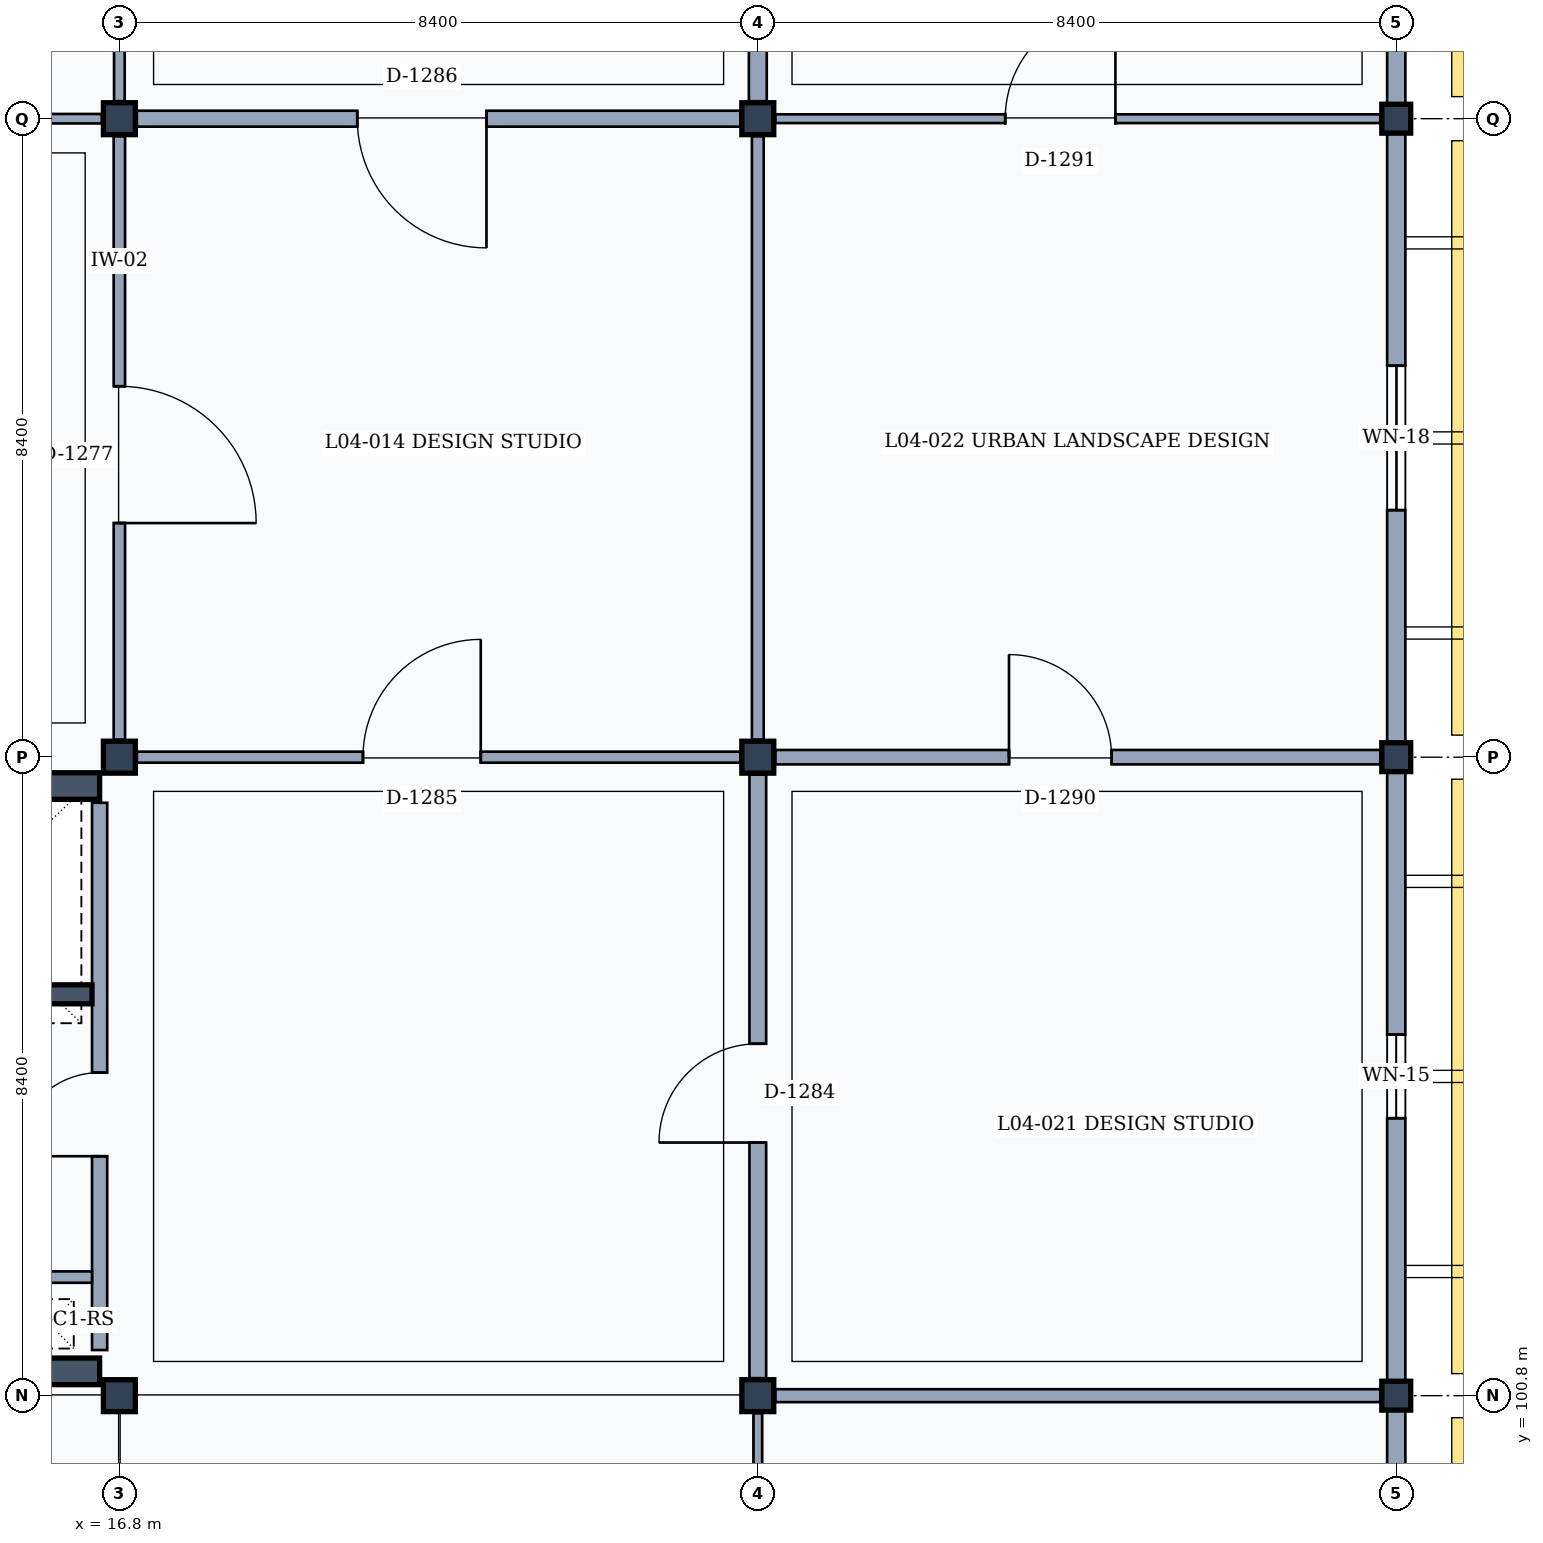
"""IFC4 building model, lengths in metres.
Left out: names, types, materials, properties, quantities, classifications, styles, units other than length and angle.
Written with IfcOpenShell. Run it as: python <this file> out.ifc"""

import sys

from ifc_helpers import new_model, si_unit, direction, frame, frame_2d, origin, origin_2d, place, context, subcontext, project, spatial, rectangle, extrude, element, fill, save


model = new_model("IFC4")
c1 = context("Model", 3, precision=1e-05, world=origin(), true_north=direction((0.0, 1.0)))
c2 = subcontext(c1, "Body", "Model", "MODEL_VIEW")
j1 = project(units=[si_unit("LENGTHUNIT", "METRE"), si_unit("PLANEANGLEUNIT", "RADIAN")], contexts=[c1])
p1 = place(None, origin())
s1 = spatial("IfcSite", under=j1, at=p1, CompositionType="ELEMENT")
p2 = place(p1, origin())
s2 = spatial("IfcBuilding", under=s1, at=p2, CompositionType="ELEMENT")
p3 = place(p2, frame((0.0, 0.0, 18.0)))
s3 = spatial("IfcBuildingStorey", under=s2, at=p3, CompositionType="ELEMENT", Elevation=18.0)
for number, where, z_axis, x_axis in (
    (1, (16.8, 100.8, 0.0), (0.0, 0.0, 1.0), (1.0, 0.0, 0.0)),
    (2, (16.8, 109.2, 0.0), (0.0, 0.0, 1.0), (1.0, 0.0, 0.0)),
    (3, (16.8, 117.6, 0.0), (0.0, 0.0, 1.0), (1.0, 0.0, 0.0)),
    (4, (25.2, 100.8, 0.0), (0.0, 0.0, 1.0), (1.0, 0.0, 0.0)),
    (5, (25.2, 109.2, 0.0), (0.0, 0.0, 1.0), (1.0, 0.0, 0.0)),
    (6, (25.2, 117.6, 0.0), (0.0, 0.0, 1.0), (1.0, 0.0, 0.0)),
):
    element("IfcColumn", number, at=place(p3, frame(where, z_axis=z_axis, x_axis=x_axis)), inside=s3, PredefinedType="COLUMN", context=c2, shape_type="SweptSolid", body=[
        extrude(rectangle(XDim=0.42, YDim=0.42, at=origin_2d()), origin(), (0.0, 0.0, 1.0), 4.2),
    ])
for number, where, z_axis, x_axis in (
    (7, (33.6, 100.8, 0.0), (0.0, 0.0, 1.0), (1.0, 0.0, 0.0)),
    (8, (33.6, 109.2, 0.0), (0.0, 0.0, 1.0), (1.0, 0.0, 0.0)),
    (9, (33.6, 117.6, 0.0), (0.0, 0.0, 1.0), (1.0, 0.0, 0.0)),
):
    element("IfcColumn", number, at=place(p3, frame(where, z_axis=z_axis, x_axis=x_axis)), inside=s3, PredefinedType="COLUMN", context=c2, shape_type="SweptSolid", body=[
        extrude(rectangle(XDim=0.38, YDim=0.38, at=origin_2d()), origin(), (0.0, 0.0, 1.0), 4.2),
    ])
p4 = place(p3, frame((33.6, 100.61, 0.0), z_axis=(0.0, 0.0, 1.0), x_axis=(0.0, -1.0, 0.0)))
e10 = element("IfcWall", 10, at=p4, inside=s3, PredefinedType="SOLIDWALL", context=c2, shape_type="SweptSolid", body=[
    extrude(rectangle(XDim=8.02, YDim=0.24, at=frame_2d((4.01, 0.0))), origin(), (0.0, 0.0, 1.0), 3.36),
])
p5 = place(p4, frame((2.91, 0.0, 0.9)))
e11 = element("IfcOpeningElement", 11, at=p5, cuts=e10, PredefinedType="OPENING", context=c2, shape_type="SweptSolid", body=[
    extrude(rectangle(XDim=2.2, YDim=1.9, at=frame_2d((1.1, 0.95))), frame((0.0, 0.13, 0.0), z_axis=(0.0, -1.0, 0.0), x_axis=(1.0, 0.0, 0.0)), (0.0, 0.0, 1.0), 0.26),
])
p6 = place(p3, frame((33.6, 109.01, 0.0), z_axis=(0.0, 0.0, 1.0), x_axis=(0.0, -1.0, 0.0)))
e12 = element("IfcWall", 12, at=p6, inside=s3, PredefinedType="SOLIDWALL", context=c2, shape_type="SweptSolid", body=[
    extrude(rectangle(XDim=8.02, YDim=0.24, at=frame_2d((4.01, 0.0))), origin(), (0.0, 0.0, 1.0), 3.36),
])
p7 = place(p6, frame((3.46, 0.0, 0.9)))
e13 = element("IfcOpeningElement", 13, at=p7, cuts=e12, PredefinedType="OPENING", context=c2, shape_type="SweptSolid", body=[
    extrude(rectangle(XDim=1.1, YDim=1.95, at=frame_2d((0.55, 0.975))), frame((0.0, 0.13, 0.0), z_axis=(0.0, -1.0, 0.0), x_axis=(1.0, 0.0, 0.0)), (0.0, 0.0, 1.0), 0.26),
])
p8 = place(p3, frame((33.6, 117.41, 0.0), z_axis=(0.0, 0.0, 1.0), x_axis=(0.0, -1.0, 0.0)))
e14 = element("IfcWall", 14, at=p8, inside=s3, PredefinedType="SOLIDWALL", context=c2, shape_type="SweptSolid", body=[
    extrude(rectangle(XDim=8.02, YDim=0.24, at=frame_2d((4.01, 0.0))), origin(), (0.0, 0.0, 1.0), 3.36),
])
p9 = place(p8, frame((3.06, 0.0, 0.9)))
e15 = element("IfcOpeningElement", 15, at=p9, cuts=e14, PredefinedType="OPENING", context=c2, shape_type="SweptSolid", body=[
    extrude(rectangle(XDim=1.9, YDim=2.05, at=frame_2d((0.95, 1.025))), frame((0.0, 0.13, 0.0), z_axis=(0.0, -1.0, 0.0), x_axis=(1.0, 0.0, 0.0)), (0.0, 0.0, 1.0), 0.26),
])
p10 = place(p3, frame((33.6, 125.83, 0.0), z_axis=(0.0, 0.0, 1.0), x_axis=(0.0, -1.0, 0.0)))
e16 = element("IfcWall", 16, at=p10, inside=s3, PredefinedType="SOLIDWALL", context=c2, shape_type="SweptSolid", body=[
    extrude(rectangle(XDim=8.04, YDim=0.24, at=frame_2d((4.02, 0.0))), origin(), (0.0, 0.0, 1.0), 3.36),
])
p11 = place(p10, frame((3.395, 0.0, 0.9)))
e17 = element("IfcOpeningElement", 17, at=p11, cuts=e16, PredefinedType="OPENING", context=c2, shape_type="SweptSolid", body=[
    extrude(rectangle(XDim=1.25, YDim=1.7, at=frame_2d((0.625, 0.85))), frame((0.0, 0.13, 0.0), z_axis=(0.0, -1.0, 0.0), x_axis=(1.0, 0.0, 0.0)), (0.0, 0.0, 1.0), 0.26),
])
p12 = place(p3, frame((8.665, 108.82, 0.0), z_axis=(0.0, 0.0, 1.0), x_axis=(1.0, 0.0, 0.0)))
e18 = element("IfcWall", 18, at=p12, inside=s3, PredefinedType="SHEAR", context=c2, shape_type="SweptSolid", body=[
    extrude(rectangle(XDim=7.875, YDim=0.35, at=frame_2d((3.938, 0.0))), origin(), (0.0, 0.0, 1.0), 3.98),
])
p13 = place(p3, frame((16.54, 108.6, 0.0), z_axis=(0.0, 0.0, 1.0), x_axis=(0.0, -1.0, 0.0)))
e19 = element("IfcWall", 19, at=p13, inside=s3, PredefinedType="PARTITIONING", context=c2, shape_type="SweptSolid", body=[
    extrude(rectangle(XDim=7.2, YDim=0.2, at=frame_2d((3.6, 0.0))), origin(), (0.0, 0.0, 1.0), 3.32),
])
p14 = place(p13, frame((3.55, 0.0, 0.0)))
e20 = element("IfcOpeningElement", 20, at=p14, cuts=e19, PredefinedType="OPENING", context=c2, shape_type="SweptSolid", body=[
    extrude(rectangle(XDim=1.1, YDim=2.15, at=frame_2d((0.55, 1.075))), frame((0.0, 0.11, 0.0), z_axis=(0.0, -1.0, 0.0), x_axis=(1.0, 0.0, 0.0)), (0.0, 0.0, 1.0), 0.22),
])
p15 = place(p3, frame((16.54, 101.12, 0.0), z_axis=(0.0, 0.0, 1.0), x_axis=(-1.0, 0.0, 0.0)))
e21 = element("IfcWall", 21, at=p15, inside=s3, PredefinedType="SHEAR", context=c2, shape_type="SweptSolid", body=[
    extrude(rectangle(XDim=7.875, YDim=0.35, at=frame_2d((3.938, 0.0))), origin(), (0.0, 0.0, 1.0), 3.98),
])
p16 = place(p3, frame((15.58, 102.36, 0.0), z_axis=(0.0, 0.0, 1.0), x_axis=(1.0, 0.0, 0.0)))
e22 = element("IfcWall", 22, at=p16, inside=s3, PredefinedType="PARTITIONING", context=c2, shape_type="SweptSolid", body=[
    extrude(rectangle(XDim=0.86, YDim=0.15, at=frame_2d((0.43, 0.0))), origin(), (0.0, 0.0, 1.0), 3.32),
])
p17 = place(p3, frame((12.98, 106.08, 0.0), z_axis=(0.0, 0.0, 1.0), x_axis=(1.0, 0.0, 0.0)))
e23 = element("IfcWall", 23, at=p17, inside=s3, PredefinedType="SHEAR", context=c2, shape_type="SweptSolid", body=[
    extrude(rectangle(XDim=3.46, YDim=0.25, at=frame_2d((1.73, 0.0))), origin(), (0.0, 0.0, 1.0), 3.98),
])
p18 = place(p17, frame((1.1, 0.0, 0.0)))
e24 = element("IfcOpeningElement", 24, at=p18, cuts=e23, PredefinedType="OPENING", context=c2, shape_type="SweptSolid", body=[
    extrude(rectangle(XDim=1.1, YDim=2.15, at=frame_2d((0.55, 1.075))), frame((0.0, 0.135, 0.0), z_axis=(0.0, -1.0, 0.0), x_axis=(1.0, 0.0, 0.0)), (0.0, 0.0, 1.0), 0.27),
])
p19 = place(p3, frame((16.8, 109.43, 0.0), z_axis=(0.0, 0.0, 1.0), x_axis=(0.0, 1.0, 0.0)))
e25 = element("IfcWall", 25, at=p19, inside=s3, PredefinedType="PARTITIONING", context=c2, shape_type="SweptSolid", body=[
    extrude(rectangle(XDim=7.94, YDim=0.15, at=frame_2d((3.97, 0.0))), origin(), (0.0, 0.0, 1.0), 3.32),
])
p20 = place(p19, frame((2.85, 0.0, 0.0)))
e26 = element("IfcOpeningElement", 26, at=p20, cuts=e25, PredefinedType="OPENING", context=c2, shape_type="SweptSolid", body=[
    extrude(rectangle(XDim=1.8, YDim=2.3, at=frame_2d((0.9, 1.15))), frame((0.0, 0.085, 0.0), z_axis=(0.0, -1.0, 0.0), x_axis=(1.0, 0.0, 0.0)), (0.0, 0.0, 1.0), 0.17),
])
p21 = place(p3, frame((8.63, 117.6, 0.0), z_axis=(0.0, 0.0, 1.0), x_axis=(1.0, 0.0, 0.0)))
e27 = element("IfcWall", 27, at=p21, inside=s3, PredefinedType="PARTITIONING", context=c2, shape_type="SweptSolid", body=[
    extrude(rectangle(XDim=7.94, YDim=0.125, at=frame_2d((3.97, 0.0))), origin(), (0.0, 0.0, 1.0), 3.32),
])
p22 = place(p21, frame((3.15, 0.0, 0.0)))
e28 = element("IfcOpeningElement", 28, at=p22, cuts=e27, PredefinedType="OPENING", context=c2, shape_type="SweptSolid", body=[
    extrude(rectangle(XDim=1.2, YDim=2.2, at=frame_2d((0.6, 1.1))), frame((0.0, 0.073, 0.0), z_axis=(0.0, -1.0, 0.0), x_axis=(1.0, 0.0, 0.0)), (0.0, 0.0, 1.0), 0.145),
])
p23 = place(p3, frame((16.8, 117.83, 0.0), z_axis=(0.0, 0.0, 1.0), x_axis=(0.0, 1.0, 0.0)))
e29 = element("IfcWall", 29, at=p23, inside=s3, PredefinedType="PARTITIONING", context=c2, shape_type="SweptSolid", body=[
    extrude(rectangle(XDim=7.94, YDim=0.14, at=frame_2d((3.97, 0.0))), origin(), (0.0, 0.0, 1.0), 3.32),
])
p24 = place(p3, frame((25.2, 92.63, 0.0), z_axis=(0.0, 0.0, 1.0), x_axis=(0.0, 1.0, 0.0)))
e30 = element("IfcWall", 30, at=p24, inside=s3, PredefinedType="PARTITIONING", context=c2, shape_type="SweptSolid", body=[
    extrude(rectangle(XDim=7.94, YDim=0.115, at=frame_2d((3.97, 0.0))), origin(), (0.0, 0.0, 1.0), 3.32),
])
p25 = place(p24, frame((3.175, 0.0, 0.0)))
e31 = element("IfcOpeningElement", 31, at=p25, cuts=e30, PredefinedType="OPENING", context=c2, shape_type="SweptSolid", body=[
    extrude(rectangle(XDim=1.15, YDim=2.25, at=frame_2d((0.575, 1.125))), frame((0.0, 0.067, 0.0), z_axis=(0.0, -1.0, 0.0), x_axis=(1.0, 0.0, 0.0)), (0.0, 0.0, 1.0), 0.135),
])
p26 = place(p3, frame((25.2, 101.03, 0.0), z_axis=(0.0, 0.0, 1.0), x_axis=(0.0, 1.0, 0.0)))
e32 = element("IfcWall", 32, at=p26, inside=s3, PredefinedType="PARTITIONING", context=c2, shape_type="SweptSolid", body=[
    extrude(rectangle(XDim=7.94, YDim=0.22, at=frame_2d((3.97, 0.0))), origin(), (0.0, 0.0, 1.0), 3.32),
])
p27 = place(p26, frame((3.1, 0.0, 0.0)))
e33 = element("IfcOpeningElement", 33, at=p27, cuts=e32, PredefinedType="OPENING", context=c2, shape_type="SweptSolid", body=[
    extrude(rectangle(XDim=1.3, YDim=2.2, at=frame_2d((0.65, 1.1))), frame((0.0, 0.12, 0.0), z_axis=(0.0, -1.0, 0.0), x_axis=(1.0, 0.0, 0.0)), (0.0, 0.0, 1.0), 0.24),
])
p28 = place(p3, frame((17.03, 109.2, 0.0), z_axis=(0.0, 0.0, 1.0), x_axis=(1.0, 0.0, 0.0)))
e34 = element("IfcWall", 34, at=p28, inside=s3, PredefinedType="PARTITIONING", context=c2, shape_type="SweptSolid", body=[
    extrude(rectangle(XDim=7.94, YDim=0.145, at=frame_2d((3.97, 0.0))), origin(), (0.0, 0.0, 1.0), 3.32),
])
p29 = place(p28, frame((2.975, 0.0, 0.0)))
e35 = element("IfcOpeningElement", 35, at=p29, cuts=e34, PredefinedType="OPENING", context=c2, shape_type="SweptSolid", body=[
    extrude(rectangle(XDim=1.55, YDim=2.35, at=frame_2d((0.775, 1.175))), frame((0.0, 0.083, 0.0), z_axis=(0.0, -1.0, 0.0), x_axis=(1.0, 0.0, 0.0)), (0.0, 0.0, 1.0), 0.165),
])
p30 = place(p3, frame((25.2, 109.43, 0.0), z_axis=(0.0, 0.0, 1.0), x_axis=(0.0, 1.0, 0.0)))
e36 = element("IfcWall", 36, at=p30, inside=s3, PredefinedType="PARTITIONING", context=c2, shape_type="SweptSolid", body=[
    extrude(rectangle(XDim=7.94, YDim=0.155, at=frame_2d((3.97, 0.0))), origin(), (0.0, 0.0, 1.0), 3.32),
])
p31 = place(p3, frame((17.03, 117.6, 0.0), z_axis=(0.0, 0.0, 1.0), x_axis=(1.0, 0.0, 0.0)))
e37 = element("IfcWall", 37, at=p31, inside=s3, PredefinedType="PARTITIONING", context=c2, shape_type="SweptSolid", body=[
    extrude(rectangle(XDim=7.94, YDim=0.21, at=frame_2d((3.97, 0.0))), origin(), (0.0, 0.0, 1.0), 3.32),
])
p32 = place(p31, frame((2.9, 0.0, 0.0)))
e38 = element("IfcOpeningElement", 38, at=p32, cuts=e37, PredefinedType="OPENING", context=c2, shape_type="SweptSolid", body=[
    extrude(rectangle(XDim=1.7, YDim=2.3, at=frame_2d((0.85, 1.15))), frame((0.0, 0.115, 0.0), z_axis=(0.0, -1.0, 0.0), x_axis=(1.0, 0.0, 0.0)), (0.0, 0.0, 1.0), 0.23),
])
p33 = place(p3, frame((25.2, 117.83, 0.0), z_axis=(0.0, 0.0, 1.0), x_axis=(0.0, 1.0, 0.0)))
e39 = element("IfcWall", 39, at=p33, inside=s3, PredefinedType="PARTITIONING", context=c2, shape_type="SweptSolid", body=[
    extrude(rectangle(XDim=7.94, YDim=0.235, at=frame_2d((3.97, 0.0))), origin(), (0.0, 0.0, 1.0), 3.32),
])
p34 = place(p3, frame((25.43, 100.8, 0.0), z_axis=(0.0, 0.0, 1.0), x_axis=(1.0, 0.0, 0.0)))
e40 = element("IfcWall", 40, at=p34, inside=s3, PredefinedType="PARTITIONING", context=c2, shape_type="SweptSolid", body=[
    extrude(rectangle(XDim=7.96, YDim=0.17, at=frame_2d((3.98, 0.0))), origin(), (0.0, 0.0, 1.0), 3.32),
])
p35 = place(p3, frame((25.43, 109.2, 0.0), z_axis=(0.0, 0.0, 1.0), x_axis=(1.0, 0.0, 0.0)))
e41 = element("IfcWall", 41, at=p35, inside=s3, PredefinedType="PARTITIONING", context=c2, shape_type="SweptSolid", body=[
    extrude(rectangle(XDim=7.96, YDim=0.19, at=frame_2d((3.98, 0.0))), origin(), (0.0, 0.0, 1.0), 3.32),
])
p36 = place(p35, frame((3.075, 0.0, 0.0)))
e42 = element("IfcOpeningElement", 42, at=p36, cuts=e41, PredefinedType="OPENING", context=c2, shape_type="SweptSolid", body=[
    extrude(rectangle(XDim=1.35, YDim=2.25, at=frame_2d((0.675, 1.125))), frame((0.0, 0.105, 0.0), z_axis=(0.0, -1.0, 0.0), x_axis=(1.0, 0.0, 0.0)), (0.0, 0.0, 1.0), 0.21),
])
p37 = place(p3, frame((25.43, 117.6, 0.0), z_axis=(0.0, 0.0, 1.0), x_axis=(1.0, 0.0, 0.0)))
e43 = element("IfcWall", 43, at=p37, inside=s3, PredefinedType="PARTITIONING", context=c2, shape_type="SweptSolid", body=[
    extrude(rectangle(XDim=7.96, YDim=0.115, at=frame_2d((3.98, 0.0))), origin(), (0.0, 0.0, 1.0), 3.32),
])
p38 = place(p37, frame((3.025, 0.0, 0.0)))
e44 = element("IfcOpeningElement", 44, at=p38, cuts=e43, PredefinedType="OPENING", context=c2, shape_type="SweptSolid", body=[
    extrude(rectangle(XDim=1.45, YDim=2.35, at=frame_2d((0.725, 1.175))), frame((0.0, 0.067, 0.0), z_axis=(0.0, -1.0, 0.0), x_axis=(1.0, 0.0, 0.0)), (0.0, 0.0, 1.0), 0.135),
])
p39 = place(p7, origin())
e45 = element("IfcWindow", 45, at=p39, inside=s3, PartitioningType="SINGLE_PANEL", PredefinedType="WINDOW", context=c2, shape_type="SweptSolid", body=[
    extrude(rectangle(XDim=1.1, YDim=1.95, at=frame_2d((0.55, 0.975))), frame((0.0, 0.03, 0.0), z_axis=(0.0, -1.0, 0.0), x_axis=(1.0, 0.0, 0.0)), (0.0, 0.0, 1.0), 0.06),
])
fill(e13, e45)
p40 = place(p9, origin())
e46 = element("IfcWindow", 46, at=p40, inside=s3, PartitioningType="SINGLE_PANEL", PredefinedType="WINDOW", context=c2, shape_type="SweptSolid", body=[
    extrude(rectangle(XDim=1.9, YDim=2.05, at=frame_2d((0.95, 1.025))), frame((0.0, 0.03, 0.0), z_axis=(0.0, -1.0, 0.0), x_axis=(1.0, 0.0, 0.0)), (0.0, 0.0, 1.0), 0.06),
])
fill(e15, e46)
p41 = place(p14, frame((1.1, 0.0, 0.0), z_axis=(0.0, 0.0, 1.0), x_axis=(-1.0, 0.0, 0.0)))
e47 = element("IfcDoor", 47, at=p41, inside=s3, OperationType="SINGLE_SWING_LEFT", PredefinedType="DOOR", context=c2, shape_type="SweptSolid", body=[
    extrude(rectangle(XDim=1.1, YDim=2.15, at=frame_2d((0.55, 1.075))), frame((0.0, 0.025, 0.0), z_axis=(0.0, -1.0, 0.0), x_axis=(1.0, 0.0, 0.0)), (0.0, 0.0, 1.0), 0.05),
])
fill(e20, e47)
p42 = place(p20, frame((1.8, 0.0, 0.0), z_axis=(0.0, 0.0, 1.0), x_axis=(-1.0, 0.0, 0.0)))
e48 = element("IfcDoor", 48, at=p42, inside=s3, OperationType="SINGLE_SWING_RIGHT", PredefinedType="DOOR", context=c2, shape_type="SweptSolid", body=[
    extrude(rectangle(XDim=1.8, YDim=2.3, at=frame_2d((0.9, 1.15))), frame((0.0, 0.025, 0.0), z_axis=(0.0, -1.0, 0.0), x_axis=(1.0, 0.0, 0.0)), (0.0, 0.0, 1.0), 0.05),
])
fill(e26, e48)
p43 = place(p27, origin())
e49 = element("IfcDoor", 49, at=p43, inside=s3, OperationType="SINGLE_SWING_LEFT", PredefinedType="DOOR", context=c2, shape_type="SweptSolid", body=[
    extrude(rectangle(XDim=1.3, YDim=2.2, at=frame_2d((0.65, 1.1))), frame((0.0, 0.025, 0.0), z_axis=(0.0, -1.0, 0.0), x_axis=(1.0, 0.0, 0.0)), (0.0, 0.0, 1.0), 0.05),
])
fill(e33, e49)
p44 = place(p29, origin())
e50 = element("IfcDoor", 50, at=p44, inside=s3, OperationType="SINGLE_SWING_RIGHT", PredefinedType="DOOR", context=c2, shape_type="SweptSolid", body=[
    extrude(rectangle(XDim=1.55, YDim=2.35, at=frame_2d((0.775, 1.175))), frame((0.0, 0.025, 0.0), z_axis=(0.0, -1.0, 0.0), x_axis=(1.0, 0.0, 0.0)), (0.0, 0.0, 1.0), 0.05),
])
fill(e35, e50)
p45 = place(p32, frame((1.7, 0.0, 0.0), z_axis=(0.0, 0.0, 1.0), x_axis=(-1.0, 0.0, 0.0)))
e51 = element("IfcDoor", 51, at=p45, inside=s3, OperationType="SINGLE_SWING_LEFT", PredefinedType="DOOR", context=c2, shape_type="SweptSolid", body=[
    extrude(rectangle(XDim=1.7, YDim=2.3, at=frame_2d((0.85, 1.15))), frame((0.0, 0.025, 0.0), z_axis=(0.0, -1.0, 0.0), x_axis=(1.0, 0.0, 0.0)), (0.0, 0.0, 1.0), 0.05),
])
fill(e38, e51)
p46 = place(p36, origin())
e52 = element("IfcDoor", 52, at=p46, inside=s3, OperationType="SINGLE_SWING_LEFT", PredefinedType="DOOR", context=c2, shape_type="SweptSolid", body=[
    extrude(rectangle(XDim=1.35, YDim=2.25, at=frame_2d((0.675, 1.125))), frame((0.0, 0.025, 0.0), z_axis=(0.0, -1.0, 0.0), x_axis=(1.0, 0.0, 0.0)), (0.0, 0.0, 1.0), 0.05),
])
fill(e42, e52)
p47 = place(p38, origin())
e53 = element("IfcDoor", 53, at=p47, inside=s3, OperationType="SINGLE_SWING_RIGHT", PredefinedType="DOOR", context=c2, shape_type="SweptSolid", body=[
    extrude(rectangle(XDim=1.45, YDim=2.35, at=frame_2d((0.725, 1.175))), frame((0.0, 0.025, 0.0), z_axis=(0.0, -1.0, 0.0), x_axis=(1.0, 0.0, 0.0)), (0.0, 0.0, 1.0), 0.05),
])
fill(e44, e53)
save(model, sys.argv[1])
